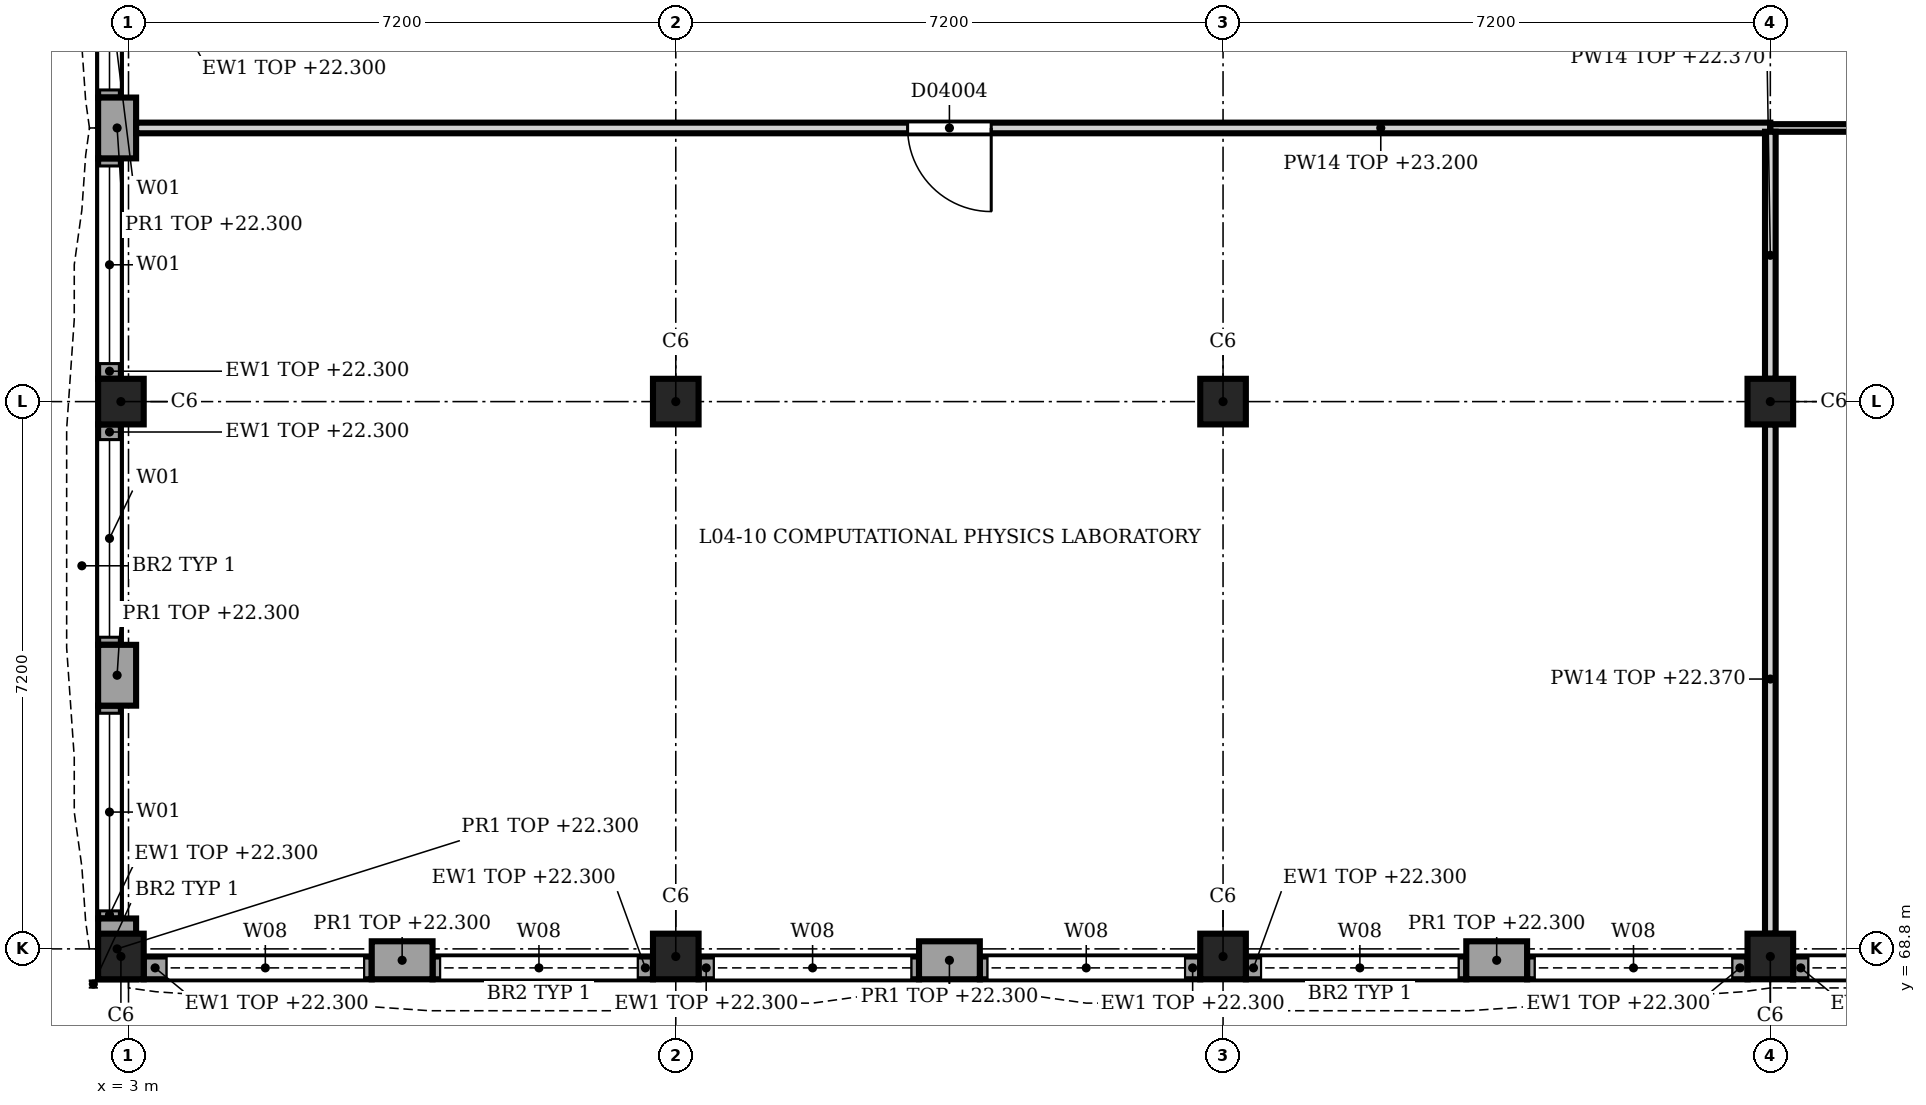
"""IFC4 building model, lengths in metres.
Left out: names, types, materials, properties, quantities, classifications, styles, units other than length and angle.
Written with IfcOpenShell. Run it as: python <this file> out.ifc"""

import sys

from ifc_helpers import new_model, si_unit, direction, frame, frame_2d, origin, origin_2d, place, context, subcontext, project, spatial, rectangle, extrude, element, fill, save


model = new_model("IFC4")
c1 = context("Model", 3, precision=1e-05, world=origin(), true_north=direction((0.0, 1.0)))
c2 = subcontext(c1, "Body", "Model", "MODEL_VIEW")
j1 = project(units=[si_unit("LENGTHUNIT", "METRE"), si_unit("PLANEANGLEUNIT", "RADIAN")], contexts=[c1])
p1 = place(None, origin())
s1 = spatial("IfcSite", under=j1, at=p1, CompositionType="ELEMENT")
p2 = place(p1, origin())
s2 = spatial("IfcBuilding", under=s1, at=p2, CompositionType="ELEMENT")
p3 = place(p2, frame((0.0, 0.0, 18.9)))
s3 = spatial("IfcBuildingStorey", under=s2, at=p3, CompositionType="ELEMENT", Elevation=18.9)
for number, where, z_axis, x_axis in (
    (1, (2.9, 68.7, 0.0), (0.0, 0.0, 1.0), (1.0, 0.0, 0.0)),
    (2, (2.9, 76.0, 0.0), (0.0, 0.0, 1.0), (1.0, 0.0, 0.0)),
    (3, (10.2, 68.7, 0.0), (0.0, 0.0, 1.0), (1.0, 0.0, 0.0)),
    (4, (10.2, 76.0, 0.0), (0.0, 0.0, 1.0), (1.0, 0.0, 0.0)),
    (5, (17.4, 68.7, 0.0), (0.0, 0.0, 1.0), (1.0, 0.0, 0.0)),
    (6, (17.4, 76.0, 0.0), (0.0, 0.0, 1.0), (1.0, 0.0, 0.0)),
    (7, (24.6, 68.7, 0.0), (0.0, 0.0, 1.0), (1.0, 0.0, 0.0)),
    (8, (24.6, 76.0, 0.0), (0.0, 0.0, 1.0), (1.0, 0.0, 0.0)),
):
    element("IfcColumn", number, at=place(p3, frame(where, z_axis=z_axis, x_axis=x_axis)), inside=s3, PredefinedType="COLUMN", context=c2, shape_type="SweptSolid", body=[
        extrude(rectangle(XDim=0.6, YDim=0.6, at=origin_2d()), origin(), (0.0, 0.0, 1.0), 4.5),
    ])
p4 = place(p3, frame((21.4, 68.65, 0.0), z_axis=(0.0, 0.0, 1.0), x_axis=(-1.0, 0.0, 0.0)))
e9 = element("IfcWall", 9, at=p4, inside=s3, PredefinedType="SOLIDWALL", context=c2, shape_type="SweptSolid", body=[
    extrude(rectangle(XDim=0.8, YDim=0.5, at=frame_2d((0.4, 0.0))), origin(), (0.0, 0.0, 1.0), 3.4),
])
for number, where, z_axis, x_axis in (
    (10, (14.2, 68.65, 0.0), (0.0, 0.0, 1.0), (-1.0, 0.0, 0.0)),
    (11, (7.0, 68.65, 0.0), (0.0, 0.0, 1.0), (-1.0, 0.0, 0.0)),
):
    element("IfcWall", number, at=place(p3, frame(where, z_axis=z_axis, x_axis=x_axis)), inside=s3, PredefinedType="SOLIDWALL", context=c2, shape_type="SweptSolid", body=[
        extrude(rectangle(XDim=0.8, YDim=0.5, at=frame_2d((0.4, 0.0))), origin(), (0.0, 0.0, 1.0), 3.4),
    ])
p5 = place(p3, frame((27.8, 68.55, 0.0), z_axis=(0.0, 0.0, 1.0), x_axis=(-1.0, 0.0, 0.0)))
e12 = element("IfcWall", 12, at=p5, inside=s3, PredefinedType="SOLIDWALL", context=c2, shape_type="SweptSolid", body=[
    extrude(rectangle(XDim=2.9, YDim=0.3, at=frame_2d((1.45, 0.0))), origin(), (0.0, 0.0, 1.0), 3.4),
])
p6 = place(p5, frame((0.1, 0.0, 1.2)))
e13 = element("IfcOpeningElement", 13, at=p6, cuts=e12, PredefinedType="OPENING", context=c2, shape_type="SweptSolid", body=[
    extrude(rectangle(XDim=2.6, YDim=2.1, at=frame_2d((1.3, 1.05))), frame((0.0, 0.16, 0.0), z_axis=(0.0, -1.0, 0.0), x_axis=(1.0, 0.0, 0.0)), (0.0, 0.0, 1.0), 0.32),
])
p7 = place(p3, frame((24.3, 68.55, 0.0), z_axis=(0.0, 0.0, 1.0), x_axis=(-1.0, 0.0, 0.0)))
e14 = element("IfcWall", 14, at=p7, inside=s3, PredefinedType="SOLIDWALL", context=c2, shape_type="SweptSolid", body=[
    extrude(rectangle(XDim=2.9, YDim=0.3, at=frame_2d((1.45, 0.0))), origin(), (0.0, 0.0, 1.0), 3.4),
])
p8 = place(p7, frame((0.2, 0.0, 1.2)))
e15 = element("IfcOpeningElement", 15, at=p8, cuts=e14, PredefinedType="OPENING", context=c2, shape_type="SweptSolid", body=[
    extrude(rectangle(XDim=2.6, YDim=2.1, at=frame_2d((1.3, 1.05))), frame((0.0, 0.16, 0.0), z_axis=(0.0, -1.0, 0.0), x_axis=(1.0, 0.0, 0.0)), (0.0, 0.0, 1.0), 0.32),
])
p9 = place(p3, frame((20.6, 68.55, 0.0), z_axis=(0.0, 0.0, 1.0), x_axis=(-1.0, 0.0, 0.0)))
e16 = element("IfcWall", 16, at=p9, inside=s3, PredefinedType="SOLIDWALL", context=c2, shape_type="SweptSolid", body=[
    extrude(rectangle(XDim=2.9, YDim=0.3, at=frame_2d((1.45, 0.0))), origin(), (0.0, 0.0, 1.0), 3.4),
])
p10 = place(p9, frame((0.1, 0.0, 1.2)))
e17 = element("IfcOpeningElement", 17, at=p10, cuts=e16, PredefinedType="OPENING", context=c2, shape_type="SweptSolid", body=[
    extrude(rectangle(XDim=2.6, YDim=2.1, at=frame_2d((1.3, 1.05))), frame((0.0, 0.16, 0.0), z_axis=(0.0, -1.0, 0.0), x_axis=(1.0, 0.0, 0.0)), (0.0, 0.0, 1.0), 0.32),
])
p11 = place(p3, frame((17.1, 68.55, 0.0), z_axis=(0.0, 0.0, 1.0), x_axis=(-1.0, 0.0, 0.0)))
e18 = element("IfcWall", 18, at=p11, inside=s3, PredefinedType="SOLIDWALL", context=c2, shape_type="SweptSolid", body=[
    extrude(rectangle(XDim=2.9, YDim=0.3, at=frame_2d((1.45, 0.0))), origin(), (0.0, 0.0, 1.0), 3.4),
])
p12 = place(p11, frame((0.2, 0.0, 1.2)))
e19 = element("IfcOpeningElement", 19, at=p12, cuts=e18, PredefinedType="OPENING", context=c2, shape_type="SweptSolid", body=[
    extrude(rectangle(XDim=2.6, YDim=2.1, at=frame_2d((1.3, 1.05))), frame((0.0, 0.16, 0.0), z_axis=(0.0, -1.0, 0.0), x_axis=(1.0, 0.0, 0.0)), (0.0, 0.0, 1.0), 0.32),
])
p13 = place(p3, frame((13.4, 68.55, 0.0), z_axis=(0.0, 0.0, 1.0), x_axis=(-1.0, 0.0, 0.0)))
e20 = element("IfcWall", 20, at=p13, inside=s3, PredefinedType="SOLIDWALL", context=c2, shape_type="SweptSolid", body=[
    extrude(rectangle(XDim=2.9, YDim=0.3, at=frame_2d((1.45, 0.0))), origin(), (0.0, 0.0, 1.0), 3.4),
])
p14 = place(p13, frame((0.1, 0.0, 1.2)))
e21 = element("IfcOpeningElement", 21, at=p14, cuts=e20, PredefinedType="OPENING", context=c2, shape_type="SweptSolid", body=[
    extrude(rectangle(XDim=2.6, YDim=2.1, at=frame_2d((1.3, 1.05))), frame((0.0, 0.16, 0.0), z_axis=(0.0, -1.0, 0.0), x_axis=(1.0, 0.0, 0.0)), (0.0, 0.0, 1.0), 0.32),
])
p15 = place(p3, frame((9.9, 68.55, 0.0), z_axis=(0.0, 0.0, 1.0), x_axis=(-1.0, 0.0, 0.0)))
e22 = element("IfcWall", 22, at=p15, inside=s3, PredefinedType="SOLIDWALL", context=c2, shape_type="SweptSolid", body=[
    extrude(rectangle(XDim=2.9, YDim=0.3, at=frame_2d((1.45, 0.0))), origin(), (0.0, 0.0, 1.0), 3.4),
])
p16 = place(p15, frame((0.2, 0.0, 1.2)))
e23 = element("IfcOpeningElement", 23, at=p16, cuts=e22, PredefinedType="OPENING", context=c2, shape_type="SweptSolid", body=[
    extrude(rectangle(XDim=2.6, YDim=2.1, at=frame_2d((1.3, 1.05))), frame((0.0, 0.16, 0.0), z_axis=(0.0, -1.0, 0.0), x_axis=(1.0, 0.0, 0.0)), (0.0, 0.0, 1.0), 0.32),
])
p17 = place(p3, frame((6.2, 68.55, 0.0), z_axis=(0.0, 0.0, 1.0), x_axis=(-1.0, 0.0, 0.0)))
e24 = element("IfcWall", 24, at=p17, inside=s3, PredefinedType="SOLIDWALL", context=c2, shape_type="SweptSolid", body=[
    extrude(rectangle(XDim=3.0, YDim=0.3, at=frame_2d((1.5, 0.0))), origin(), (0.0, 0.0, 1.0), 3.4),
])
p18 = place(p17, frame((0.1, 0.0, 1.2)))
e25 = element("IfcOpeningElement", 25, at=p18, cuts=e24, PredefinedType="OPENING", context=c2, shape_type="SweptSolid", body=[
    extrude(rectangle(XDim=2.6, YDim=2.1, at=frame_2d((1.3, 1.05))), frame((0.0, 0.16, 0.0), z_axis=(0.0, -1.0, 0.0), x_axis=(1.0, 0.0, 0.0)), (0.0, 0.0, 1.0), 0.32),
])
for number, where, z_axis, x_axis in (
    (26, (2.85, 68.4, 0.0), (0.0, 0.0, 1.0), (0.0, 1.0, 0.0)),
    (27, (2.85, 72.0, 0.0), (0.0, 0.0, 1.0), (0.0, 1.0, 0.0)),
    (28, (2.85, 79.2, 0.0), (0.0, 0.0, 1.0), (0.0, 1.0, 0.0)),
):
    element("IfcWall", number, at=place(p3, frame(where, z_axis=z_axis, x_axis=x_axis)), inside=s3, PredefinedType="SOLIDWALL", context=c2, shape_type="SweptSolid", body=[
        extrude(rectangle(XDim=0.8, YDim=0.5, at=frame_2d((0.4, 0.0))), origin(), (0.0, 0.0, 1.0), 3.4),
    ])
p19 = place(p3, frame((2.75, 69.2, 0.0), z_axis=(0.0, 0.0, 1.0), x_axis=(0.0, 1.0, 0.0)))
e29 = element("IfcWall", 29, at=p19, inside=s3, PredefinedType="SOLIDWALL", context=c2, shape_type="SweptSolid", body=[
    extrude(rectangle(XDim=2.8, YDim=0.3, at=frame_2d((1.4, 0.0))), origin(), (0.0, 0.0, 1.0), 3.4),
])
p20 = place(p19, frame((0.1, 0.0, 0.9)))
e30 = element("IfcOpeningElement", 30, at=p20, cuts=e29, PredefinedType="OPENING", context=c2, shape_type="SweptSolid", body=[
    extrude(rectangle(XDim=2.6, YDim=2.4, at=frame_2d((1.3, 1.2))), frame((0.0, 0.16, 0.0), z_axis=(0.0, -1.0, 0.0), x_axis=(1.0, 0.0, 0.0)), (0.0, 0.0, 1.0), 0.32),
])
p21 = place(p3, frame((2.75, 72.8, 0.0), z_axis=(0.0, 0.0, 1.0), x_axis=(0.0, 1.0, 0.0)))
e31 = element("IfcWall", 31, at=p21, inside=s3, PredefinedType="SOLIDWALL", context=c2, shape_type="SweptSolid", body=[
    extrude(rectangle(XDim=2.9, YDim=0.3, at=frame_2d((1.45, 0.0))), origin(), (0.0, 0.0, 1.0), 3.4),
])
p22 = place(p21, frame((0.1, 0.0, 0.9)))
e32 = element("IfcOpeningElement", 32, at=p22, cuts=e31, PredefinedType="OPENING", context=c2, shape_type="SweptSolid", body=[
    extrude(rectangle(XDim=2.6, YDim=2.4, at=frame_2d((1.3, 1.2))), frame((0.0, 0.16, 0.0), z_axis=(0.0, -1.0, 0.0), x_axis=(1.0, 0.0, 0.0)), (0.0, 0.0, 1.0), 0.32),
])
p23 = place(p3, frame((2.75, 76.3, 0.0), z_axis=(0.0, 0.0, 1.0), x_axis=(0.0, 1.0, 0.0)))
e33 = element("IfcWall", 33, at=p23, inside=s3, PredefinedType="SOLIDWALL", context=c2, shape_type="SweptSolid", body=[
    extrude(rectangle(XDim=2.9, YDim=0.3, at=frame_2d((1.45, 0.0))), origin(), (0.0, 0.0, 1.0), 3.4),
])
p24 = place(p23, frame((0.2, 0.0, 0.9)))
e34 = element("IfcOpeningElement", 34, at=p24, cuts=e33, PredefinedType="OPENING", context=c2, shape_type="SweptSolid", body=[
    extrude(rectangle(XDim=2.6, YDim=2.4, at=frame_2d((1.3, 1.2))), frame((0.0, 0.16, 0.0), z_axis=(0.0, -1.0, 0.0), x_axis=(1.0, 0.0, 0.0)), (0.0, 0.0, 1.0), 0.32),
])
p25 = place(p3, frame((2.75, 80.0, 0.0), z_axis=(0.0, 0.0, 1.0), x_axis=(0.0, 1.0, 0.0)))
e35 = element("IfcWall", 35, at=p25, inside=s3, PredefinedType="SOLIDWALL", context=c2, shape_type="SweptSolid", body=[
    extrude(rectangle(XDim=2.9, YDim=0.3, at=frame_2d((1.45, 0.0))), origin(), (0.0, 0.0, 1.0), 3.4),
])
p26 = place(p25, frame((0.1, 0.0, 0.9)))
e36 = element("IfcOpeningElement", 36, at=p26, cuts=e35, PredefinedType="OPENING", context=c2, shape_type="SweptSolid", body=[
    extrude(rectangle(XDim=2.6, YDim=2.4, at=frame_2d((1.3, 1.2))), frame((0.0, 0.16, 0.0), z_axis=(0.0, -1.0, 0.0), x_axis=(1.0, 0.0, 0.0)), (0.0, 0.0, 1.0), 0.32),
])
p27 = place(p3, frame((24.6, 79.6, 0.0), z_axis=(0.0, 0.0, 1.0), x_axis=(-1.0, 0.0, 0.0)))
e37 = element("IfcWall", 37, at=p27, inside=s3, PredefinedType="PARTITIONING", context=c2, shape_type="SweptSolid", body=[
    extrude(rectangle(XDim=21.5, YDim=0.14, at=frame_2d((10.75, 0.0))), origin(), (0.0, 0.0, 1.0), 4.3),
])
p28 = place(p27, frame((10.25, 0.0, 0.0)))
e38 = element("IfcOpeningElement", 38, at=p28, cuts=e37, PredefinedType="OPENING", context=c2, shape_type="SweptSolid", body=[
    extrude(rectangle(XDim=1.1, YDim=2.2, at=frame_2d((0.55, 1.1))), frame((0.0, 0.08, 0.0), z_axis=(0.0, -1.0, 0.0), x_axis=(1.0, 0.0, 0.0)), (0.0, 0.0, 1.0), 0.16),
])
p29 = place(p3, frame((35.4, 79.6, 0.0), z_axis=(0.0, 0.0, 1.0), x_axis=(-1.0, 0.0, 0.0)))
e39 = element("IfcWall", 39, at=p29, inside=s3, PredefinedType="PARTITIONING", context=c2, shape_type="SweptSolid", body=[
    extrude(rectangle(XDim=10.8, YDim=0.1, at=frame_2d((5.4, 0.0))), origin(), (0.0, 0.0, 1.0), 4.3),
])
p30 = place(p29, frame((4.95, 0.0, 0.0)))
e40 = element("IfcOpeningElement", 40, at=p30, cuts=e39, PredefinedType="OPENING", context=c2, shape_type="SweptSolid", body=[
    extrude(rectangle(XDim=1.0, YDim=2.1, at=frame_2d((0.5, 1.05))), frame((0.0, 0.06, 0.0), z_axis=(0.0, -1.0, 0.0), x_axis=(1.0, 0.0, 0.0)), (0.0, 0.0, 1.0), 0.12),
])
p31 = place(p3, frame((24.6, 69.0, 0.0), z_axis=(0.0, 0.0, 1.0), x_axis=(0.0, 1.0, 0.0)))
e41 = element("IfcWall", 41, at=p31, inside=s3, PredefinedType="PARTITIONING", context=c2, shape_type="SweptSolid", body=[
    extrude(rectangle(XDim=6.7, YDim=0.14, at=frame_2d((3.35, 0.0))), origin(), (0.0, 0.0, 1.0), 3.47),
])
p32 = place(p3, frame((24.6, 76.3, 0.0), z_axis=(0.0, 0.0, 1.0), x_axis=(0.0, 1.0, 0.0)))
e42 = element("IfcWall", 42, at=p32, inside=s3, PredefinedType="PARTITIONING", context=c2, shape_type="SweptSolid", body=[
    extrude(rectangle(XDim=3.25, YDim=0.14, at=frame_2d((1.625, 0.0))), origin(), (0.0, 0.0, 1.0), 3.47),
])
p33 = place(p6, origin())
e43 = element("IfcWindow", 43, at=p33, inside=s3, PartitioningType="SINGLE_PANEL", PredefinedType="WINDOW", context=c2, shape_type="SweptSolid", body=[
    extrude(rectangle(XDim=2.6, YDim=2.1, at=frame_2d((1.3, 1.05))), frame((0.0, 0.03, 0.0), z_axis=(0.0, -1.0, 0.0), x_axis=(1.0, 0.0, 0.0)), (0.0, 0.0, 1.0), 0.06),
])
fill(e13, e43)
p34 = place(p8, origin())
e44 = element("IfcWindow", 44, at=p34, inside=s3, PartitioningType="SINGLE_PANEL", PredefinedType="WINDOW", context=c2, shape_type="SweptSolid", body=[
    extrude(rectangle(XDim=2.6, YDim=2.1, at=frame_2d((1.3, 1.05))), frame((0.0, 0.03, 0.0), z_axis=(0.0, -1.0, 0.0), x_axis=(1.0, 0.0, 0.0)), (0.0, 0.0, 1.0), 0.06),
])
fill(e15, e44)
p35 = place(p10, origin())
e45 = element("IfcWindow", 45, at=p35, inside=s3, PartitioningType="SINGLE_PANEL", PredefinedType="WINDOW", context=c2, shape_type="SweptSolid", body=[
    extrude(rectangle(XDim=2.6, YDim=2.1, at=frame_2d((1.3, 1.05))), frame((0.0, 0.03, 0.0), z_axis=(0.0, -1.0, 0.0), x_axis=(1.0, 0.0, 0.0)), (0.0, 0.0, 1.0), 0.06),
])
fill(e17, e45)
p36 = place(p12, origin())
e46 = element("IfcWindow", 46, at=p36, inside=s3, PartitioningType="SINGLE_PANEL", PredefinedType="WINDOW", context=c2, shape_type="SweptSolid", body=[
    extrude(rectangle(XDim=2.6, YDim=2.1, at=frame_2d((1.3, 1.05))), frame((0.0, 0.03, 0.0), z_axis=(0.0, -1.0, 0.0), x_axis=(1.0, 0.0, 0.0)), (0.0, 0.0, 1.0), 0.06),
])
fill(e19, e46)
p37 = place(p14, origin())
e47 = element("IfcWindow", 47, at=p37, inside=s3, PartitioningType="SINGLE_PANEL", PredefinedType="WINDOW", context=c2, shape_type="SweptSolid", body=[
    extrude(rectangle(XDim=2.6, YDim=2.1, at=frame_2d((1.3, 1.05))), frame((0.0, 0.03, 0.0), z_axis=(0.0, -1.0, 0.0), x_axis=(1.0, 0.0, 0.0)), (0.0, 0.0, 1.0), 0.06),
])
fill(e21, e47)
p38 = place(p16, origin())
e48 = element("IfcWindow", 48, at=p38, inside=s3, PartitioningType="SINGLE_PANEL", PredefinedType="WINDOW", context=c2, shape_type="SweptSolid", body=[
    extrude(rectangle(XDim=2.6, YDim=2.1, at=frame_2d((1.3, 1.05))), frame((0.0, 0.03, 0.0), z_axis=(0.0, -1.0, 0.0), x_axis=(1.0, 0.0, 0.0)), (0.0, 0.0, 1.0), 0.06),
])
fill(e23, e48)
p39 = place(p18, origin())
e49 = element("IfcWindow", 49, at=p39, inside=s3, PartitioningType="SINGLE_PANEL", PredefinedType="WINDOW", context=c2, shape_type="SweptSolid", body=[
    extrude(rectangle(XDim=2.6, YDim=2.1, at=frame_2d((1.3, 1.05))), frame((0.0, 0.03, 0.0), z_axis=(0.0, -1.0, 0.0), x_axis=(1.0, 0.0, 0.0)), (0.0, 0.0, 1.0), 0.06),
])
fill(e25, e49)
p40 = place(p20, origin())
e50 = element("IfcWindow", 50, at=p40, inside=s3, PartitioningType="SINGLE_PANEL", PredefinedType="WINDOW", context=c2, shape_type="SweptSolid", body=[
    extrude(rectangle(XDim=2.6, YDim=2.4, at=frame_2d((1.3, 1.2))), frame((0.0, 0.03, 0.0), z_axis=(0.0, -1.0, 0.0), x_axis=(1.0, 0.0, 0.0)), (0.0, 0.0, 1.0), 0.06),
])
fill(e30, e50)
p41 = place(p22, origin())
e51 = element("IfcWindow", 51, at=p41, inside=s3, PartitioningType="SINGLE_PANEL", PredefinedType="WINDOW", context=c2, shape_type="SweptSolid", body=[
    extrude(rectangle(XDim=2.6, YDim=2.4, at=frame_2d((1.3, 1.2))), frame((0.0, 0.03, 0.0), z_axis=(0.0, -1.0, 0.0), x_axis=(1.0, 0.0, 0.0)), (0.0, 0.0, 1.0), 0.06),
])
fill(e32, e51)
p42 = place(p24, origin())
e52 = element("IfcWindow", 52, at=p42, inside=s3, PartitioningType="SINGLE_PANEL", PredefinedType="WINDOW", context=c2, shape_type="SweptSolid", body=[
    extrude(rectangle(XDim=2.6, YDim=2.4, at=frame_2d((1.3, 1.2))), frame((0.0, 0.03, 0.0), z_axis=(0.0, -1.0, 0.0), x_axis=(1.0, 0.0, 0.0)), (0.0, 0.0, 1.0), 0.06),
])
fill(e34, e52)
p43 = place(p26, origin())
e53 = element("IfcWindow", 53, at=p43, inside=s3, PartitioningType="SINGLE_PANEL", PredefinedType="WINDOW", context=c2, shape_type="SweptSolid", body=[
    extrude(rectangle(XDim=2.6, YDim=2.4, at=frame_2d((1.3, 1.2))), frame((0.0, 0.03, 0.0), z_axis=(0.0, -1.0, 0.0), x_axis=(1.0, 0.0, 0.0)), (0.0, 0.0, 1.0), 0.06),
])
fill(e36, e53)
p44 = place(p28, origin())
e54 = element("IfcDoor", 54, at=p44, inside=s3, OperationType="SINGLE_SWING_RIGHT", PredefinedType="DOOR", context=c2, shape_type="SweptSolid", body=[
    extrude(rectangle(XDim=1.1, YDim=2.2, at=frame_2d((0.55, 1.1))), frame((0.0, 0.025, 0.0), z_axis=(0.0, -1.0, 0.0), x_axis=(1.0, 0.0, 0.0)), (0.0, 0.0, 1.0), 0.05),
])
fill(e38, e54)
save(model, sys.argv[1])
